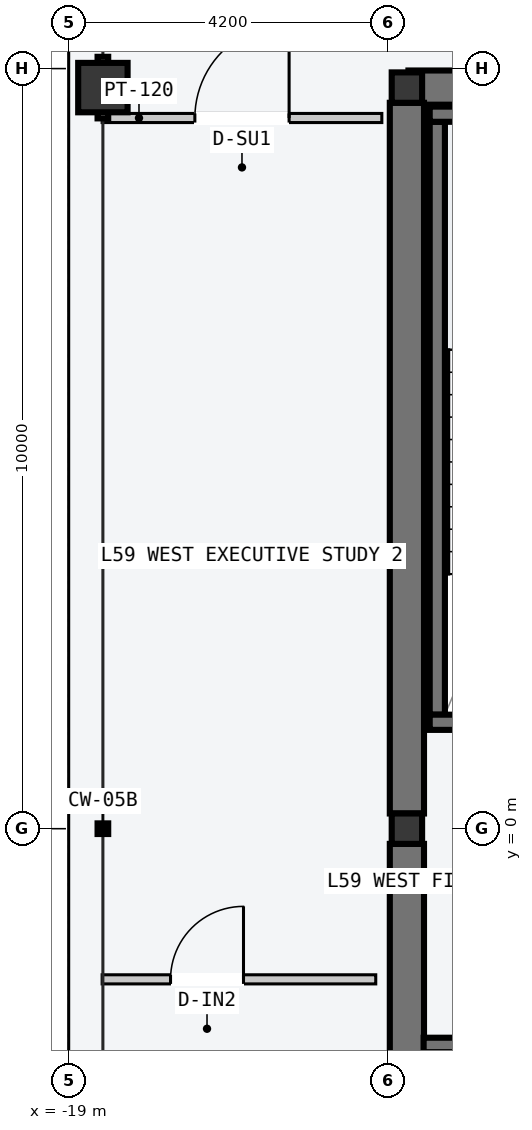
"""IFC4 building model, lengths in metres.
Left out: names, types, materials, properties, quantities, classifications, styles, units other than length and angle.
Written with IfcOpenShell. Run it as: python <this file> out.ifc"""

import sys

from ifc_helpers import new_model, si_unit, direction, frame, frame_2d, origin, origin_2d, place, context, subcontext, project, spatial, rectangle, hollow_rectangle, i_section, extrude, element, fill, save


model = new_model("IFC4")
c1 = context("Model", 3, precision=1e-05, world=origin(), true_north=direction((0.0, 1.0)))
c2 = subcontext(c1, "Body", "Model", "MODEL_VIEW")
j1 = project(units=[si_unit("LENGTHUNIT", "METRE"), si_unit("PLANEANGLEUNIT", "RADIAN")], contexts=[c1])
p1 = place(None, origin())
s1 = spatial("IfcSite", under=j1, at=p1, CompositionType="ELEMENT")
p2 = place(p1, origin())
s2 = spatial("IfcBuilding", under=s1, at=p2, CompositionType="ELEMENT")
p3 = place(p2, frame((0.0, 0.0, 225.6)))
s3 = spatial("IfcBuildingStorey", under=s2, at=p3, CompositionType="ELEMENT", Elevation=225.6)
p4 = place(p3, frame((-14.53, 9.75, -0.2), z_axis=(0.0, 0.0, 1.0), x_axis=(1.0, 0.0, 0.0)))
e1 = element("IfcWall", 1, at=p4, inside=s3, PredefinedType="SHEAR", context=c2, shape_type="SweptSolid", body=[
    extrude(rectangle(XDim=6.46, YDim=0.45, at=frame_2d((3.23, 0.0))), origin(), (0.0, 0.0, 1.0), 3.6),
])
for number, where, z_axis, x_axis in (
    (2, (-14.55, -9.55, -0.2), (0.0, 0.0, 1.0), (0.0, 1.0, 0.0)),
    (3, (-14.55, 0.2, -0.2), (0.0, 0.0, 1.0), (0.0, 1.0, 0.0)),
):
    element("IfcWall", number, at=place(p3, frame(where, z_axis=z_axis, x_axis=x_axis)), inside=s3, PredefinedType="SHEAR", context=c2, shape_type="SweptSolid", body=[
        extrude(rectangle(XDim=9.35, YDim=0.45, at=frame_2d((4.675, 0.0))), origin(), (0.0, 0.0, 1.0), 3.6),
    ])
p5 = place(p3, frame((-14.15, 1.5, -0.2), z_axis=(0.0, 0.0, 1.0), x_axis=(0.0, 1.0, 0.0)))
e4 = element("IfcWall", 4, at=p5, inside=s3, PredefinedType="SOLIDWALL", context=c2, shape_type="SweptSolid", body=[
    extrude(rectangle(XDim=7.8, YDim=0.2, at=frame_2d((3.9, 0.0))), origin(), (0.0, 0.0, 1.0), 3.6),
])
p6 = place(p3, frame((-14.25, 1.4, -0.2), z_axis=(0.0, 0.0, 1.0), x_axis=(1.0, 0.0, 0.0)))
e5 = element("IfcWall", 5, at=p6, inside=s3, PredefinedType="SOLIDWALL", context=c2, shape_type="SweptSolid", body=[
    extrude(rectangle(XDim=3.72, YDim=0.2, at=frame_2d((1.86, 0.0))), origin(), (0.0, 0.0, 1.0), 3.6),
])
p7 = place(p6, frame((1.5, 0.0, 0.2)))
e6 = element("IfcOpeningElement", 6, at=p7, cuts=e5, PredefinedType="OPENING", context=c2, shape_type="SweptSolid", body=[
    extrude(rectangle(XDim=1.12, YDim=2.18, at=frame_2d((0.56, 1.09))), frame((0.0, 0.11, 0.0), z_axis=(0.0, -1.0, 0.0), x_axis=(1.0, 0.0, 0.0)), (0.0, 0.0, 1.0), 0.22),
])
p8 = place(p3, frame((-14.25, 9.4, -0.2), z_axis=(0.0, 0.0, 1.0), x_axis=(1.0, 0.0, 0.0)))
e7 = element("IfcWall", 7, at=p8, inside=s3, PredefinedType="SOLIDWALL", context=c2, shape_type="SweptSolid", body=[
    extrude(rectangle(XDim=3.72, YDim=0.2, at=frame_2d((1.86, 0.0))), origin(), (0.0, 0.0, 1.0), 3.6),
])
for number, where, z_axis, x_axis in (
    (8, (-14.55, 0.0, 0.0), (0.0, 0.0, 1.0), (1.0, 0.0, 0.0)),
    (9, (-14.55, 9.75, 0.0), (0.0, 0.0, 1.0), (1.0, 0.0, 0.0)),
):
    element("IfcColumn", number, at=place(p3, frame(where, z_axis=z_axis, x_axis=x_axis)), inside=s3, PredefinedType="COLUMN", context=c2, shape_type="SweptSolid", body=[
        extrude(i_section(OverallWidth=0.4, OverallDepth=0.4, WebThickness=0.013, FlangeThickness=0.021, at=origin_2d()), origin(), (0.0, 0.0, 1.0), 3.6),
    ])
p9 = place(p3, frame((-18.55, 9.75, 0.0), z_axis=(0.0, 0.0, 1.0), x_axis=(0.0, 1.0, 0.0)))
e10 = element("IfcColumn", 10, at=p9, inside=s3, PredefinedType="COLUMN", context=c2, shape_type="SweptSolid", body=[
    extrude(hollow_rectangle(XDim=0.65, YDim=0.65, WallThickness=0.028, at=origin_2d()), origin(), (0.0, 0.0, 1.0), 3.6),
])
p10 = place(p3, frame((-14.33, -2.845, -0.2), z_axis=(0.0, 0.0, 1.0), x_axis=(1.0, 0.0, 0.0)))
e11 = element("IfcWall", 11, at=p10, inside=s3, PredefinedType="SOLIDWALL", context=c2, shape_type="SweptSolid", body=[
    extrude(rectangle(XDim=2.68, YDim=0.19, at=frame_2d((1.34, 0.0))), origin(), (0.0, 0.0, 1.0), 3.6),
])
p11 = place(p10, frame((0.83, 0.0, 0.2)))
e12 = element("IfcOpeningElement", 12, at=p11, cuts=e11, PredefinedType="OPENING", context=c2, shape_type="SweptSolid", body=[
    extrude(rectangle(XDim=1.2, YDim=2.2, at=frame_2d((0.6, 1.1))), frame((0.0, 0.105, 0.0), z_axis=(0.0, -1.0, 0.0), x_axis=(1.0, 0.0, 0.0)), (0.0, 0.0, 1.0), 0.21),
])
p12 = place(p3, frame((-18.56, 9.35, 0.0), z_axis=(0.0, 0.0, 1.0), x_axis=(1.0, 0.0, 0.0)))
e13 = element("IfcWall", 13, at=p12, inside=s3, PredefinedType="PARTITIONING", context=c2, shape_type="SweptSolid", body=[
    extrude(rectangle(XDim=3.68, YDim=0.12, at=frame_2d((1.84, 0.0))), origin(), (0.0, 0.0, 1.0), 3.4),
])
p13 = place(p12, frame((1.22, 0.0, 0.0)))
e14 = element("IfcOpeningElement", 14, at=p13, cuts=e13, PredefinedType="OPENING", context=c2, shape_type="SweptSolid", body=[
    extrude(rectangle(XDim=1.24, YDim=2.24, at=frame_2d((0.62, 1.12))), frame((0.0, 0.07, 0.0), z_axis=(0.0, -1.0, 0.0), x_axis=(1.0, 0.0, 0.0)), (0.0, 0.0, 1.0), 0.14),
])
p14 = place(p3, frame((-18.56, -1.982, 0.0), z_axis=(0.0, 0.0, 1.0), x_axis=(1.0, 0.0, 0.0)))
e15 = element("IfcWall", 15, at=p14, inside=s3, PredefinedType="PARTITIONING", context=c2, shape_type="SweptSolid", body=[
    extrude(rectangle(XDim=3.6, YDim=0.12, at=frame_2d((1.8, 0.0))), origin(), (0.0, 0.0, 1.0), 3.4),
])
p15 = place(p14, frame((0.9, 0.0, 0.0)))
e16 = element("IfcOpeningElement", 16, at=p15, cuts=e15, PredefinedType="OPENING", context=c2, shape_type="SweptSolid", body=[
    extrude(rectangle(XDim=0.96, YDim=2.18, at=frame_2d((0.48, 1.09))), frame((0.0, 0.07, 0.0), z_axis=(0.0, -1.0, 0.0), x_axis=(1.0, 0.0, 0.0)), (0.0, 0.0, 1.0), 0.14),
])
p16 = place(p13, origin())
e17 = element("IfcDoor", 17, at=p16, inside=s3, OperationType="SINGLE_SWING_RIGHT", PredefinedType="DOOR", context=c2, shape_type="SweptSolid", body=[
    extrude(rectangle(XDim=1.24, YDim=2.24, at=frame_2d((0.62, 1.12))), frame((0.0, 0.025, 0.0), z_axis=(0.0, -1.0, 0.0), x_axis=(1.0, 0.0, 0.0)), (0.0, 0.0, 1.0), 0.05),
])
fill(e14, e17)
p17 = place(p15, origin())
e18 = element("IfcDoor", 18, at=p17, inside=s3, OperationType="SINGLE_SWING_RIGHT", PredefinedType="DOOR", context=c2, shape_type="SweptSolid", body=[
    extrude(rectangle(XDim=0.96, YDim=2.18, at=frame_2d((0.48, 1.09))), frame((0.0, 0.025, 0.0), z_axis=(0.0, -1.0, 0.0), x_axis=(1.0, 0.0, 0.0)), (0.0, 0.0, 1.0), 0.05),
])
fill(e16, e18)
save(model, sys.argv[1])
